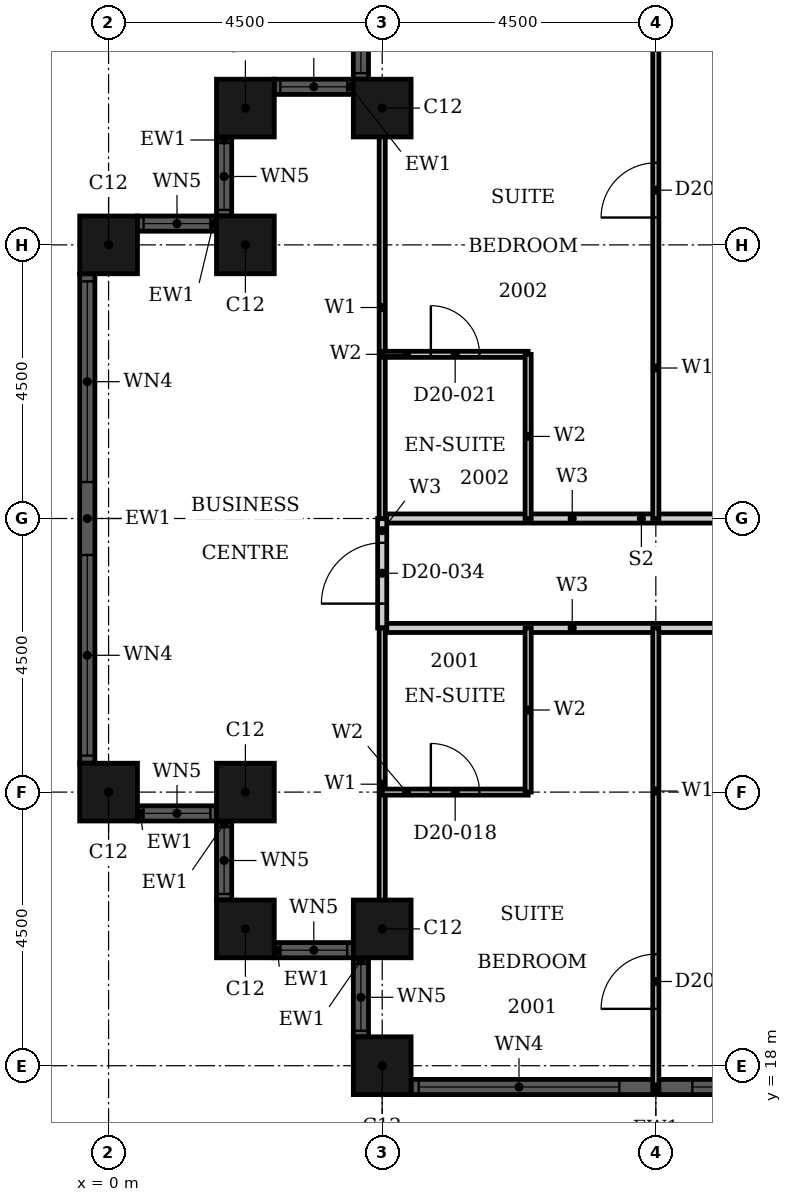
"""IFC4 building model, lengths in metres.
Left out: names, types, materials, properties, quantities, classifications, styles, units other than length and angle.
Written with IfcOpenShell. Run it as: python <this file> out.ifc"""

import sys

from ifc_helpers import new_model, si_unit, direction, frame, frame_2d, origin, origin_2d, place, context, subcontext, project, spatial, rectangle, hollow_rectangle, extrude, element, fill, save


model = new_model("IFC4")
c1 = context("Model", 3, precision=1e-05, world=origin(), true_north=direction((0.0, 1.0)))
c2 = subcontext(c1, "Body", "Model", "MODEL_VIEW")
j1 = project(units=[si_unit("LENGTHUNIT", "METRE"), si_unit("PLANEANGLEUNIT", "RADIAN")], contexts=[c1])
p1 = place(None, origin())
s1 = spatial("IfcSite", under=j1, at=p1, CompositionType="ELEMENT")
p2 = place(p1, origin())
s2 = spatial("IfcBuilding", under=s1, at=p2, CompositionType="ELEMENT")
p3 = place(p2, frame((0.0, 0.0, 85.2)))
s3 = spatial("IfcBuildingStorey", under=s2, at=p3, CompositionType="ELEMENT", Elevation=85.2)
for number, where, z_axis, x_axis in (
    (1, (4.5, 33.75, 0.0), (0.0, 0.0, 1.0), (1.0, 0.0, 0.0)),
    (2, (2.25, 33.75, 0.0), (0.0, 0.0, 1.0), (1.0, 0.0, 0.0)),
    (3, (2.25, 31.5, 0.0), (0.0, 0.0, 1.0), (1.0, 0.0, 0.0)),
    (4, (0.0, 31.5, 0.0), (0.0, 0.0, 1.0), (1.0, 0.0, 0.0)),
    (5, (0.0, 22.5, 0.0), (0.0, 0.0, 1.0), (1.0, 0.0, 0.0)),
    (6, (2.25, 22.5, 0.0), (0.0, 0.0, 1.0), (1.0, 0.0, 0.0)),
    (7, (2.25, 20.25, 0.0), (0.0, 0.0, 1.0), (1.0, 0.0, 0.0)),
    (8, (4.5, 20.25, 0.0), (0.0, 0.0, 1.0), (1.0, 0.0, 0.0)),
    (9, (4.5, 18.0, 0.0), (0.0, 0.0, 1.0), (1.0, 0.0, 0.0)),
):
    element("IfcColumn", number, at=place(p3, frame(where, z_axis=z_axis, x_axis=x_axis)), inside=s3, PredefinedType="COLUMN", context=c2, shape_type="SweptSolid", body=[
        extrude(hollow_rectangle(XDim=0.95, YDim=0.95, WallThickness=0.03, at=origin_2d()), origin(), (0.0, 0.0, 1.0), 3.6),
    ])
p4 = place(p3, frame((4.15, 35.525, 0.0), z_axis=(0.0, 0.0, 1.0), x_axis=(0.0, -1.0, 0.0)))
e10 = element("IfcWall", 10, at=p4, inside=s3, PredefinedType="SOLIDWALL", context=c2, shape_type="SweptSolid", body=[
    extrude(rectangle(XDim=1.3, YDim=0.25, at=frame_2d((0.65, 0.0))), origin(), (0.0, 0.0, 1.0), 3.6),
])
p5 = place(p4, frame((0.1, 0.0, 0.9)))
e11 = element("IfcOpeningElement", 11, at=p5, cuts=e10, PredefinedType="OPENING", context=c2, shape_type="SweptSolid", body=[
    extrude(rectangle(XDim=1.1, YDim=2.08, at=frame_2d((0.55, 1.04))), frame((0.0, 0.135, 0.0), z_axis=(0.0, -1.0, 0.0), x_axis=(1.0, 0.0, 0.0)), (0.0, 0.0, 1.0), 0.27),
])
p6 = place(p3, frame((4.025, 34.1, 0.0), z_axis=(0.0, 0.0, 1.0), x_axis=(-1.0, 0.0, 0.0)))
e12 = element("IfcWall", 12, at=p6, inside=s3, PredefinedType="SOLIDWALL", context=c2, shape_type="SweptSolid", body=[
    extrude(rectangle(XDim=1.3, YDim=0.25, at=frame_2d((0.65, 0.0))), origin(), (0.0, 0.0, 1.0), 3.6),
])
p7 = place(p6, frame((0.1, 0.0, 0.9)))
e13 = element("IfcOpeningElement", 13, at=p7, cuts=e12, PredefinedType="OPENING", context=c2, shape_type="SweptSolid", body=[
    extrude(rectangle(XDim=1.1, YDim=2.08, at=frame_2d((0.55, 1.04))), frame((0.0, 0.135, 0.0), z_axis=(0.0, -1.0, 0.0), x_axis=(1.0, 0.0, 0.0)), (0.0, 0.0, 1.0), 0.27),
])
p8 = place(p3, frame((1.9, 33.275, 0.0), z_axis=(0.0, 0.0, 1.0), x_axis=(0.0, -1.0, 0.0)))
e14 = element("IfcWall", 14, at=p8, inside=s3, PredefinedType="SOLIDWALL", context=c2, shape_type="SweptSolid", body=[
    extrude(rectangle(XDim=1.3, YDim=0.25, at=frame_2d((0.65, 0.0))), origin(), (0.0, 0.0, 1.0), 3.6),
])
p9 = place(p8, frame((0.1, 0.0, 0.9)))
e15 = element("IfcOpeningElement", 15, at=p9, cuts=e14, PredefinedType="OPENING", context=c2, shape_type="SweptSolid", body=[
    extrude(rectangle(XDim=1.1, YDim=2.08, at=frame_2d((0.55, 1.04))), frame((0.0, 0.135, 0.0), z_axis=(0.0, -1.0, 0.0), x_axis=(1.0, 0.0, 0.0)), (0.0, 0.0, 1.0), 0.27),
])
p10 = place(p3, frame((1.775, 31.85, 0.0), z_axis=(0.0, 0.0, 1.0), x_axis=(-1.0, 0.0, 0.0)))
e16 = element("IfcWall", 16, at=p10, inside=s3, PredefinedType="SOLIDWALL", context=c2, shape_type="SweptSolid", body=[
    extrude(rectangle(XDim=1.3, YDim=0.25, at=frame_2d((0.65, 0.0))), origin(), (0.0, 0.0, 1.0), 3.6),
])
p11 = place(p10, frame((0.1, 0.0, 0.9)))
e17 = element("IfcOpeningElement", 17, at=p11, cuts=e16, PredefinedType="OPENING", context=c2, shape_type="SweptSolid", body=[
    extrude(rectangle(XDim=1.1, YDim=2.08, at=frame_2d((0.55, 1.04))), frame((0.0, 0.135, 0.0), z_axis=(0.0, -1.0, 0.0), x_axis=(1.0, 0.0, 0.0)), (0.0, 0.0, 1.0), 0.27),
])
p12 = place(p3, frame((-0.35, 31.025, 0.0), z_axis=(0.0, 0.0, 1.0), x_axis=(0.0, -1.0, 0.0)))
e18 = element("IfcWall", 18, at=p12, inside=s3, PredefinedType="SOLIDWALL", context=c2, shape_type="SweptSolid", body=[
    extrude(rectangle(XDim=8.05, YDim=0.25, at=frame_2d((4.025, 0.0))), origin(), (0.0, 0.0, 1.0), 3.6),
])
p13 = place(p12, frame((0.125, 0.0, 0.9)))
e19 = element("IfcOpeningElement", 19, at=p13, cuts=e18, PredefinedType="OPENING", context=c2, shape_type="SweptSolid", body=[
    extrude(rectangle(XDim=3.3, YDim=2.08, at=frame_2d((1.65, 1.04))), frame((0.0, 0.135, 0.0), z_axis=(0.0, -1.0, 0.0), x_axis=(1.0, 0.0, 0.0)), (0.0, 0.0, 1.0), 0.27),
])
p14 = place(p12, frame((4.625, 0.0, 0.9)))
e20 = element("IfcOpeningElement", 20, at=p14, cuts=e18, PredefinedType="OPENING", context=c2, shape_type="SweptSolid", body=[
    extrude(rectangle(XDim=3.3, YDim=2.08, at=frame_2d((1.65, 1.04))), frame((0.0, 0.135, 0.0), z_axis=(0.0, -1.0, 0.0), x_axis=(1.0, 0.0, 0.0)), (0.0, 0.0, 1.0), 0.27),
])
p15 = place(p3, frame((0.475, 22.15, 0.0), z_axis=(0.0, 0.0, 1.0), x_axis=(1.0, 0.0, 0.0)))
e21 = element("IfcWall", 21, at=p15, inside=s3, PredefinedType="SOLIDWALL", context=c2, shape_type="SweptSolid", body=[
    extrude(rectangle(XDim=1.3, YDim=0.25, at=frame_2d((0.65, 0.0))), origin(), (0.0, 0.0, 1.0), 3.6),
])
p16 = place(p15, frame((0.1, 0.0, 0.9)))
e22 = element("IfcOpeningElement", 22, at=p16, cuts=e21, PredefinedType="OPENING", context=c2, shape_type="SweptSolid", body=[
    extrude(rectangle(XDim=1.1, YDim=2.08, at=frame_2d((0.55, 1.04))), frame((0.0, 0.135, 0.0), z_axis=(0.0, -1.0, 0.0), x_axis=(1.0, 0.0, 0.0)), (0.0, 0.0, 1.0), 0.27),
])
p17 = place(p3, frame((1.9, 22.025, 0.0), z_axis=(0.0, 0.0, 1.0), x_axis=(0.0, -1.0, 0.0)))
e23 = element("IfcWall", 23, at=p17, inside=s3, PredefinedType="SOLIDWALL", context=c2, shape_type="SweptSolid", body=[
    extrude(rectangle(XDim=1.3, YDim=0.25, at=frame_2d((0.65, 0.0))), origin(), (0.0, 0.0, 1.0), 3.6),
])
p18 = place(p17, frame((0.1, 0.0, 0.9)))
e24 = element("IfcOpeningElement", 24, at=p18, cuts=e23, PredefinedType="OPENING", context=c2, shape_type="SweptSolid", body=[
    extrude(rectangle(XDim=1.1, YDim=2.08, at=frame_2d((0.55, 1.04))), frame((0.0, 0.135, 0.0), z_axis=(0.0, -1.0, 0.0), x_axis=(1.0, 0.0, 0.0)), (0.0, 0.0, 1.0), 0.27),
])
p19 = place(p3, frame((2.725, 19.9, 0.0), z_axis=(0.0, 0.0, 1.0), x_axis=(1.0, 0.0, 0.0)))
e25 = element("IfcWall", 25, at=p19, inside=s3, PredefinedType="SOLIDWALL", context=c2, shape_type="SweptSolid", body=[
    extrude(rectangle(XDim=1.3, YDim=0.25, at=frame_2d((0.65, 0.0))), origin(), (0.0, 0.0, 1.0), 3.6),
])
p20 = place(p19, frame((0.1, 0.0, 0.9)))
e26 = element("IfcOpeningElement", 26, at=p20, cuts=e25, PredefinedType="OPENING", context=c2, shape_type="SweptSolid", body=[
    extrude(rectangle(XDim=1.1, YDim=2.08, at=frame_2d((0.55, 1.04))), frame((0.0, 0.135, 0.0), z_axis=(0.0, -1.0, 0.0), x_axis=(1.0, 0.0, 0.0)), (0.0, 0.0, 1.0), 0.27),
])
p21 = place(p3, frame((4.15, 19.775, 0.0), z_axis=(0.0, 0.0, 1.0), x_axis=(0.0, -1.0, 0.0)))
e27 = element("IfcWall", 27, at=p21, inside=s3, PredefinedType="SOLIDWALL", context=c2, shape_type="SweptSolid", body=[
    extrude(rectangle(XDim=1.3, YDim=0.25, at=frame_2d((0.65, 0.0))), origin(), (0.0, 0.0, 1.0), 3.6),
])
p22 = place(p21, frame((0.1, 0.0, 0.9)))
e28 = element("IfcOpeningElement", 28, at=p22, cuts=e27, PredefinedType="OPENING", context=c2, shape_type="SweptSolid", body=[
    extrude(rectangle(XDim=1.1, YDim=2.08, at=frame_2d((0.55, 1.04))), frame((0.0, 0.135, 0.0), z_axis=(0.0, -1.0, 0.0), x_axis=(1.0, 0.0, 0.0)), (0.0, 0.0, 1.0), 0.27),
])
p23 = place(p3, frame((4.975, 17.65, 0.0), z_axis=(0.0, 0.0, 1.0), x_axis=(1.0, 0.0, 0.0)))
e29 = element("IfcWall", 29, at=p23, inside=s3, PredefinedType="SOLIDWALL", context=c2, shape_type="SweptSolid", body=[
    extrude(rectangle(XDim=8.05, YDim=0.25, at=frame_2d((4.025, 0.0))), origin(), (0.0, 0.0, 1.0), 3.6),
])
p24 = place(p23, frame((0.125, 0.0, 0.9)))
e30 = element("IfcOpeningElement", 30, at=p24, cuts=e29, PredefinedType="OPENING", context=c2, shape_type="SweptSolid", body=[
    extrude(rectangle(XDim=3.3, YDim=2.08, at=frame_2d((1.65, 1.04))), frame((0.0, 0.135, 0.0), z_axis=(0.0, -1.0, 0.0), x_axis=(1.0, 0.0, 0.0)), (0.0, 0.0, 1.0), 0.27),
])
p25 = place(p23, frame((4.625, 0.0, 0.9)))
e31 = element("IfcOpeningElement", 31, at=p25, cuts=e29, PredefinedType="OPENING", context=c2, shape_type="SweptSolid", body=[
    extrude(rectangle(XDim=3.3, YDim=2.08, at=frame_2d((1.65, 1.04))), frame((0.0, 0.135, 0.0), z_axis=(0.0, -1.0, 0.0), x_axis=(1.0, 0.0, 0.0)), (0.0, 0.0, 1.0), 0.27),
])
p26 = place(p3, frame((4.5, 25.2, 0.0), z_axis=(0.0, 0.0, 1.0), x_axis=(1.0, 0.0, 0.0)))
e32 = element("IfcWall", 32, at=p26, inside=s3, PredefinedType="PARTITIONING", context=c2, shape_type="SweptSolid", body=[
    extrude(rectangle(XDim=11.7, YDim=0.15, at=frame_2d((5.85, 0.0))), origin(), (0.0, 0.0, 1.0), 3.3),
])
p27 = place(p26, frame((6.25, 0.0, 0.0)))
e33 = element("IfcOpeningElement", 33, at=p27, cuts=e32, PredefinedType="OPENING", context=c2, shape_type="SweptSolid", body=[
    extrude(rectangle(XDim=1.0, YDim=2.1, at=frame_2d((0.5, 1.05))), frame((0.0, 0.085, 0.0), z_axis=(0.0, -1.0, 0.0), x_axis=(1.0, 0.0, 0.0)), (0.0, 0.0, 1.0), 0.17),
])
p28 = place(p3, frame((4.5, 27.0, 0.0), z_axis=(0.0, 0.0, 1.0), x_axis=(1.0, 0.0, 0.0)))
e34 = element("IfcWall", 34, at=p28, inside=s3, PredefinedType="PARTITIONING", context=c2, shape_type="SweptSolid", body=[
    extrude(rectangle(XDim=11.7, YDim=0.15, at=frame_2d((5.85, 0.0))), origin(), (0.0, 0.0, 1.0), 2.58),
])
p29 = place(p28, frame((6.25, 0.0, 0.0)))
e35 = element("IfcOpeningElement", 35, at=p29, cuts=e34, PredefinedType="OPENING", context=c2, shape_type="SweptSolid", body=[
    extrude(rectangle(XDim=1.0, YDim=2.1, at=frame_2d((0.5, 1.05))), frame((0.0, 0.085, 0.0), z_axis=(0.0, -1.0, 0.0), x_axis=(1.0, 0.0, 0.0)), (0.0, 0.0, 1.0), 0.17),
])
p30 = place(p3, frame((4.5, 25.2, 0.0), z_axis=(0.0, 0.0, 1.0), x_axis=(0.0, 1.0, 0.0)))
e36 = element("IfcWall", 36, at=p30, inside=s3, PredefinedType="PARTITIONING", context=c2, shape_type="SweptSolid", body=[
    extrude(rectangle(XDim=1.8, YDim=0.15, at=frame_2d((0.9, 0.0))), origin(), (0.0, 0.0, 1.0), 3.3),
])
p31 = place(p30, frame((0.4, 0.0, 0.0)))
e37 = element("IfcOpeningElement", 37, at=p31, cuts=e36, PredefinedType="OPENING", context=c2, shape_type="SweptSolid", body=[
    extrude(rectangle(XDim=1.0, YDim=2.1, at=frame_2d((0.5, 1.05))), frame((0.0, 0.085, 0.0), z_axis=(0.0, -1.0, 0.0), x_axis=(1.0, 0.0, 0.0)), (0.0, 0.0, 1.0), 0.17),
])
p32 = place(p3, frame((4.5, 27.0, 0.0), z_axis=(0.0, 0.0, 1.0), x_axis=(0.0, 1.0, 0.0)))
e38 = element("IfcWall", 38, at=p32, inside=s3, PredefinedType="PARTITIONING", context=c2, shape_type="SweptSolid", body=[
    extrude(rectangle(XDim=6.94, YDim=0.1, at=frame_2d((3.47, 0.0))), origin(), (0.0, 0.0, 1.0), 3.3),
])
p33 = place(p3, frame((4.5, 20.06, 0.0), z_axis=(0.0, 0.0, 1.0), x_axis=(0.0, 1.0, 0.0)))
e39 = element("IfcWall", 39, at=p33, inside=s3, PredefinedType="PARTITIONING", context=c2, shape_type="SweptSolid", body=[
    extrude(rectangle(XDim=5.14, YDim=0.1, at=frame_2d((2.57, 0.0))), origin(), (0.0, 0.0, 1.0), 3.3),
])
p34 = place(p3, frame((9.0, 27.0, 0.0), z_axis=(0.0, 0.0, 1.0), x_axis=(0.0, 1.0, 0.0)))
e40 = element("IfcWall", 40, at=p34, inside=s3, PredefinedType="PARTITIONING", context=c2, shape_type="SweptSolid", body=[
    extrude(rectangle(XDim=9.415, YDim=0.1, at=frame_2d((4.708, 0.0))), origin(), (0.0, 0.0, 1.0), 3.3),
])
p35 = place(p34, frame((4.95, 0.0, 0.0)))
e41 = element("IfcOpeningElement", 41, at=p35, cuts=e40, PredefinedType="OPENING", context=c2, shape_type="SweptSolid", body=[
    extrude(rectangle(XDim=0.9, YDim=2.1, at=frame_2d((0.45, 1.05))), frame((0.0, 0.06, 0.0), z_axis=(0.0, -1.0, 0.0), x_axis=(1.0, 0.0, 0.0)), (0.0, 0.0, 1.0), 0.12),
])
p36 = place(p3, frame((9.0, 17.585, 0.0), z_axis=(0.0, 0.0, 1.0), x_axis=(0.0, 1.0, 0.0)))
e42 = element("IfcWall", 42, at=p36, inside=s3, PredefinedType="PARTITIONING", context=c2, shape_type="SweptSolid", body=[
    extrude(rectangle(XDim=7.615, YDim=0.1, at=frame_2d((3.808, 0.0))), origin(), (0.0, 0.0, 1.0), 3.3),
])
p37 = place(p36, frame((1.35, 0.0, 0.0)))
e43 = element("IfcOpeningElement", 43, at=p37, cuts=e42, PredefinedType="OPENING", context=c2, shape_type="SweptSolid", body=[
    extrude(rectangle(XDim=0.9, YDim=2.1, at=frame_2d((0.45, 1.05))), frame((0.0, 0.06, 0.0), z_axis=(0.0, -1.0, 0.0), x_axis=(1.0, 0.0, 0.0)), (0.0, 0.0, 1.0), 0.12),
])
p38 = place(p3, frame((4.5, 22.5, 0.0), z_axis=(0.0, 0.0, 1.0), x_axis=(1.0, 0.0, 0.0)))
e44 = element("IfcWall", 44, at=p38, inside=s3, PredefinedType="PARTITIONING", context=c2, shape_type="SweptSolid", body=[
    extrude(rectangle(XDim=2.4, YDim=0.1, at=frame_2d((1.2, 0.0))), origin(), (0.0, 0.0, 1.0), 2.58),
])
p39 = place(p38, frame((0.8, 0.0, 0.0)))
e45 = element("IfcOpeningElement", 45, at=p39, cuts=e44, PredefinedType="OPENING", context=c2, shape_type="SweptSolid", body=[
    extrude(rectangle(XDim=0.8, YDim=2.1, at=frame_2d((0.4, 1.05))), frame((0.0, 0.06, 0.0), z_axis=(0.0, -1.0, 0.0), x_axis=(1.0, 0.0, 0.0)), (0.0, 0.0, 1.0), 0.12),
])
p40 = place(p3, frame((4.5, 29.7, 0.0), z_axis=(0.0, 0.0, 1.0), x_axis=(1.0, 0.0, 0.0)))
e46 = element("IfcWall", 46, at=p40, inside=s3, PredefinedType="PARTITIONING", context=c2, shape_type="SweptSolid", body=[
    extrude(rectangle(XDim=2.4, YDim=0.1, at=frame_2d((1.2, 0.0))), origin(), (0.0, 0.0, 1.0), 3.3),
])
p41 = place(p40, frame((0.8, 0.0, 0.0)))
e47 = element("IfcOpeningElement", 47, at=p41, cuts=e46, PredefinedType="OPENING", context=c2, shape_type="SweptSolid", body=[
    extrude(rectangle(XDim=0.8, YDim=2.1, at=frame_2d((0.4, 1.05))), frame((0.0, 0.06, 0.0), z_axis=(0.0, -1.0, 0.0), x_axis=(1.0, 0.0, 0.0)), (0.0, 0.0, 1.0), 0.12),
])
for number, where, z_axis, x_axis in (
    (48, (6.9, 27.0, 0.0), (0.0, 0.0, 1.0), (0.0, 1.0, 0.0)),
    (49, (6.9, 22.5, 0.0), (0.0, 0.0, 1.0), (0.0, 1.0, 0.0)),
):
    element("IfcWall", number, at=place(p3, frame(where, z_axis=z_axis, x_axis=x_axis)), inside=s3, PredefinedType="PARTITIONING", context=c2, shape_type="SweptSolid", body=[
        extrude(rectangle(XDim=2.7, YDim=0.1, at=frame_2d((1.35, 0.0))), origin(), (0.0, 0.0, 1.0), 3.3),
    ])
p42 = place(p5, origin())
e50 = element("IfcWindow", 50, at=p42, inside=s3, PartitioningType="SINGLE_PANEL", PredefinedType="WINDOW", context=c2, shape_type="SweptSolid", body=[
    extrude(rectangle(XDim=1.1, YDim=2.08, at=frame_2d((0.55, 1.04))), frame((0.0, 0.03, 0.0), z_axis=(0.0, -1.0, 0.0), x_axis=(1.0, 0.0, 0.0)), (0.0, 0.0, 1.0), 0.06),
])
fill(e11, e50)
p43 = place(p7, origin())
e51 = element("IfcWindow", 51, at=p43, inside=s3, PartitioningType="SINGLE_PANEL", PredefinedType="WINDOW", context=c2, shape_type="SweptSolid", body=[
    extrude(rectangle(XDim=1.1, YDim=2.08, at=frame_2d((0.55, 1.04))), frame((0.0, 0.03, 0.0), z_axis=(0.0, -1.0, 0.0), x_axis=(1.0, 0.0, 0.0)), (0.0, 0.0, 1.0), 0.06),
])
fill(e13, e51)
p44 = place(p9, origin())
e52 = element("IfcWindow", 52, at=p44, inside=s3, PartitioningType="SINGLE_PANEL", PredefinedType="WINDOW", context=c2, shape_type="SweptSolid", body=[
    extrude(rectangle(XDim=1.1, YDim=2.08, at=frame_2d((0.55, 1.04))), frame((0.0, 0.03, 0.0), z_axis=(0.0, -1.0, 0.0), x_axis=(1.0, 0.0, 0.0)), (0.0, 0.0, 1.0), 0.06),
])
fill(e15, e52)
p45 = place(p11, origin())
e53 = element("IfcWindow", 53, at=p45, inside=s3, PartitioningType="SINGLE_PANEL", PredefinedType="WINDOW", context=c2, shape_type="SweptSolid", body=[
    extrude(rectangle(XDim=1.1, YDim=2.08, at=frame_2d((0.55, 1.04))), frame((0.0, 0.03, 0.0), z_axis=(0.0, -1.0, 0.0), x_axis=(1.0, 0.0, 0.0)), (0.0, 0.0, 1.0), 0.06),
])
fill(e17, e53)
p46 = place(p13, origin())
e54 = element("IfcWindow", 54, at=p46, inside=s3, PartitioningType="SINGLE_PANEL", PredefinedType="WINDOW", context=c2, shape_type="SweptSolid", body=[
    extrude(rectangle(XDim=3.3, YDim=2.08, at=frame_2d((1.65, 1.04))), frame((0.0, 0.03, 0.0), z_axis=(0.0, -1.0, 0.0), x_axis=(1.0, 0.0, 0.0)), (0.0, 0.0, 1.0), 0.06),
])
fill(e19, e54)
p47 = place(p14, origin())
e55 = element("IfcWindow", 55, at=p47, inside=s3, PartitioningType="SINGLE_PANEL", PredefinedType="WINDOW", context=c2, shape_type="SweptSolid", body=[
    extrude(rectangle(XDim=3.3, YDim=2.08, at=frame_2d((1.65, 1.04))), frame((0.0, 0.03, 0.0), z_axis=(0.0, -1.0, 0.0), x_axis=(1.0, 0.0, 0.0)), (0.0, 0.0, 1.0), 0.06),
])
fill(e20, e55)
p48 = place(p16, origin())
e56 = element("IfcWindow", 56, at=p48, inside=s3, PartitioningType="SINGLE_PANEL", PredefinedType="WINDOW", context=c2, shape_type="SweptSolid", body=[
    extrude(rectangle(XDim=1.1, YDim=2.08, at=frame_2d((0.55, 1.04))), frame((0.0, 0.03, 0.0), z_axis=(0.0, -1.0, 0.0), x_axis=(1.0, 0.0, 0.0)), (0.0, 0.0, 1.0), 0.06),
])
fill(e22, e56)
p49 = place(p18, origin())
e57 = element("IfcWindow", 57, at=p49, inside=s3, PartitioningType="SINGLE_PANEL", PredefinedType="WINDOW", context=c2, shape_type="SweptSolid", body=[
    extrude(rectangle(XDim=1.1, YDim=2.08, at=frame_2d((0.55, 1.04))), frame((0.0, 0.03, 0.0), z_axis=(0.0, -1.0, 0.0), x_axis=(1.0, 0.0, 0.0)), (0.0, 0.0, 1.0), 0.06),
])
fill(e24, e57)
p50 = place(p20, origin())
e58 = element("IfcWindow", 58, at=p50, inside=s3, PartitioningType="SINGLE_PANEL", PredefinedType="WINDOW", context=c2, shape_type="SweptSolid", body=[
    extrude(rectangle(XDim=1.1, YDim=2.08, at=frame_2d((0.55, 1.04))), frame((0.0, 0.03, 0.0), z_axis=(0.0, -1.0, 0.0), x_axis=(1.0, 0.0, 0.0)), (0.0, 0.0, 1.0), 0.06),
])
fill(e26, e58)
p51 = place(p22, origin())
e59 = element("IfcWindow", 59, at=p51, inside=s3, PartitioningType="SINGLE_PANEL", PredefinedType="WINDOW", context=c2, shape_type="SweptSolid", body=[
    extrude(rectangle(XDim=1.1, YDim=2.08, at=frame_2d((0.55, 1.04))), frame((0.0, 0.03, 0.0), z_axis=(0.0, -1.0, 0.0), x_axis=(1.0, 0.0, 0.0)), (0.0, 0.0, 1.0), 0.06),
])
fill(e28, e59)
p52 = place(p24, origin())
e60 = element("IfcWindow", 60, at=p52, inside=s3, PartitioningType="SINGLE_PANEL", PredefinedType="WINDOW", context=c2, shape_type="SweptSolid", body=[
    extrude(rectangle(XDim=3.3, YDim=2.08, at=frame_2d((1.65, 1.04))), frame((0.0, 0.03, 0.0), z_axis=(0.0, -1.0, 0.0), x_axis=(1.0, 0.0, 0.0)), (0.0, 0.0, 1.0), 0.06),
])
fill(e30, e60)
p53 = place(p25, origin())
e61 = element("IfcWindow", 61, at=p53, inside=s3, PartitioningType="SINGLE_PANEL", PredefinedType="WINDOW", context=c2, shape_type="SweptSolid", body=[
    extrude(rectangle(XDim=3.3, YDim=2.08, at=frame_2d((1.65, 1.04))), frame((0.0, 0.03, 0.0), z_axis=(0.0, -1.0, 0.0), x_axis=(1.0, 0.0, 0.0)), (0.0, 0.0, 1.0), 0.06),
])
fill(e31, e61)
p54 = place(p37, origin())
e62 = element("IfcDoor", 62, at=p54, inside=s3, OperationType="SINGLE_SWING_LEFT", PredefinedType="DOOR", context=c2, shape_type="SweptSolid", body=[
    extrude(rectangle(XDim=0.9, YDim=2.1, at=frame_2d((0.45, 1.05))), frame((0.0, 0.025, 0.0), z_axis=(0.0, -1.0, 0.0), x_axis=(1.0, 0.0, 0.0)), (0.0, 0.0, 1.0), 0.05),
])
fill(e43, e62)
p55 = place(p39, origin())
e63 = element("IfcDoor", 63, at=p55, inside=s3, OperationType="SINGLE_SWING_RIGHT", PredefinedType="DOOR", context=c2, shape_type="SweptSolid", body=[
    extrude(rectangle(XDim=0.8, YDim=2.1, at=frame_2d((0.4, 1.05))), frame((0.0, 0.025, 0.0), z_axis=(0.0, -1.0, 0.0), x_axis=(1.0, 0.0, 0.0)), (0.0, 0.0, 1.0), 0.05),
])
fill(e45, e63)
p56 = place(p35, origin())
e64 = element("IfcDoor", 64, at=p56, inside=s3, OperationType="SINGLE_SWING_RIGHT", PredefinedType="DOOR", context=c2, shape_type="SweptSolid", body=[
    extrude(rectangle(XDim=0.9, YDim=2.1, at=frame_2d((0.45, 1.05))), frame((0.0, 0.025, 0.0), z_axis=(0.0, -1.0, 0.0), x_axis=(1.0, 0.0, 0.0)), (0.0, 0.0, 1.0), 0.05),
])
fill(e41, e64)
p57 = place(p41, origin())
e65 = element("IfcDoor", 65, at=p57, inside=s3, OperationType="SINGLE_SWING_RIGHT", PredefinedType="DOOR", context=c2, shape_type="SweptSolid", body=[
    extrude(rectangle(XDim=0.8, YDim=2.1, at=frame_2d((0.4, 1.05))), frame((0.0, 0.025, 0.0), z_axis=(0.0, -1.0, 0.0), x_axis=(1.0, 0.0, 0.0)), (0.0, 0.0, 1.0), 0.05),
])
fill(e47, e65)
p58 = place(p31, origin())
e66 = element("IfcDoor", 66, at=p58, inside=s3, OperationType="SINGLE_SWING_RIGHT", PredefinedType="DOOR", context=c2, shape_type="SweptSolid", body=[
    extrude(rectangle(XDim=1.0, YDim=2.1, at=frame_2d((0.5, 1.05))), frame((0.0, 0.025, 0.0), z_axis=(0.0, -1.0, 0.0), x_axis=(1.0, 0.0, 0.0)), (0.0, 0.0, 1.0), 0.05),
])
fill(e37, e66)
save(model, sys.argv[1])
